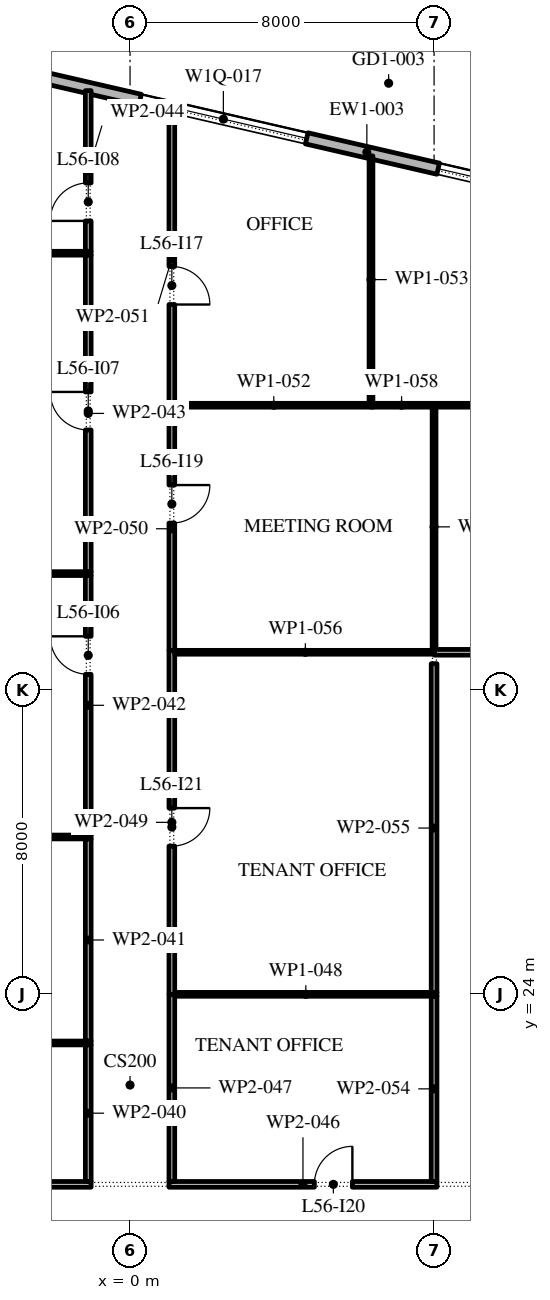
"""IFC4 building model, lengths in metres.
Left out: names, types, materials, properties, quantities, classifications, styles, units other than length and angle.
Written with IfcOpenShell. Run it as: python <this file> out.ifc"""

import sys

from ifc_helpers import new_model, si_unit, direction, frame, frame_2d, origin, place, context, subcontext, project, spatial, rectangle, extrude, element, fill, save


model = new_model("IFC4")
c1 = context("Model", 3, precision=1e-05, world=origin(), true_north=direction((0.0, 1.0)))
c2 = subcontext(c1, "Body", "Model", "MODEL_VIEW")
j1 = project(units=[si_unit("LENGTHUNIT", "METRE"), si_unit("PLANEANGLEUNIT", "RADIAN")], contexts=[c1])
p1 = place(None, origin())
s1 = spatial("IfcSite", under=j1, at=p1, CompositionType="ELEMENT")
p2 = place(p1, origin())
s2 = spatial("IfcBuilding", under=s1, at=p2, CompositionType="ELEMENT")
p3 = place(p2, frame((0.0, 0.0, 259.8)))
s3 = spatial("IfcBuildingStorey", under=s2, at=p3, CompositionType="ELEMENT", Elevation=259.8)
p4 = place(p3, frame((29.616, 40.758, 0.0), z_axis=(0.0, 0.0, 1.0), x_axis=(-0.974370532314, 0.224949029246, 0.0)))
e1 = element("IfcWall", 1, at=p4, inside=s3, PredefinedType="STANDARD", context=c2, shape_type="SweptSolid", body=[
    extrude(rectangle(XDim=48.0, YDim=0.3, at=frame_2d((24.0, 0.0))), origin(), (0.0, 0.0, 1.0), 4.0),
])
p5 = place(p4, frame((1.625, 0.0, 0.45)))
e2 = element("IfcOpeningElement", 2, at=p5, cuts=e1, PredefinedType="OPENING", context=c2, shape_type="SweptSolid", body=[
    extrude(rectangle(XDim=4.5, YDim=2.65, at=frame_2d((2.25, 1.325))), frame((0.0, 0.16, 0.0), z_axis=(0.0, -1.0, 0.0), x_axis=(1.0, 0.0, 0.0)), (0.0, 0.0, 1.0), 0.32),
])
p6 = place(p4, frame((10.575, 0.0, 0.0)))
e3 = element("IfcOpeningElement", 3, at=p6, cuts=e1, PredefinedType="OPENING", context=c2, shape_type="SweptSolid", body=[
    extrude(rectangle(XDim=2.4, YDim=3.5, at=frame_2d((1.2, 1.75))), frame((0.0, 0.16, 0.0), z_axis=(0.0, -1.0, 0.0), x_axis=(1.0, 0.0, 0.0)), (0.0, 0.0, 1.0), 0.32),
])
p7 = place(p4, frame((17.575, 0.0, 0.45)))
e4 = element("IfcOpeningElement", 4, at=p7, cuts=e1, PredefinedType="OPENING", context=c2, shape_type="SweptSolid", body=[
    extrude(rectangle(XDim=4.5, YDim=2.5, at=frame_2d((2.25, 1.25))), frame((0.0, 0.16, 0.0), z_axis=(0.0, -1.0, 0.0), x_axis=(1.0, 0.0, 0.0)), (0.0, 0.0, 1.0), 0.32),
])
p8 = place(p4, frame((25.625, 0.0, 0.45)))
e5 = element("IfcOpeningElement", 5, at=p8, cuts=e1, PredefinedType="OPENING", context=c2, shape_type="SweptSolid", body=[
    extrude(rectangle(XDim=4.5, YDim=2.45, at=frame_2d((2.25, 1.225))), frame((0.0, 0.16, 0.0), z_axis=(0.0, -1.0, 0.0), x_axis=(1.0, 0.0, 0.0)), (0.0, 0.0, 1.0), 0.32),
])
p9 = place(p4, frame((33.675, 0.0, 0.45)))
e6 = element("IfcOpeningElement", 6, at=p9, cuts=e1, PredefinedType="OPENING", context=c2, shape_type="SweptSolid", body=[
    extrude(rectangle(XDim=4.5, YDim=2.45, at=frame_2d((2.25, 1.225))), frame((0.0, 0.16, 0.0), z_axis=(0.0, -1.0, 0.0), x_axis=(1.0, 0.0, 0.0)), (0.0, 0.0, 1.0), 0.32),
])
p10 = place(p4, frame((42.775, 0.0, 0.0)))
e7 = element("IfcOpeningElement", 7, at=p10, cuts=e1, PredefinedType="OPENING", context=c2, shape_type="SweptSolid", body=[
    extrude(rectangle(XDim=2.4, YDim=3.5, at=frame_2d((1.2, 1.75))), frame((0.0, 0.16, 0.0), z_axis=(0.0, -1.0, 0.0), x_axis=(1.0, 0.0, 0.0)), (0.0, 0.0, 1.0), 0.32),
])
p11 = place(p3, frame((-9.29, 43.5, 0.0), z_axis=(0.0, 0.0, 1.0), x_axis=(1.0, 0.0, 0.0)))
e8 = element("IfcWall", 8, at=p11, inside=s3, PredefinedType="PARTITIONING", context=c2, shape_type="SweptSolid", body=[
    extrude(rectangle(XDim=8.265, YDim=0.1, at=frame_2d((4.133, 0.0))), origin(), (0.0, 0.0, 1.0), 4.0),
])
p12 = place(p3, frame((-7.935, 35.07, 0.0), z_axis=(0.0, 0.0, 1.0), x_axis=(1.0, 0.0, 0.0)))
e9 = element("IfcWall", 9, at=p12, inside=s3, PredefinedType="PARTITIONING", context=c2, shape_type="SweptSolid", body=[
    extrude(rectangle(XDim=6.91, YDim=0.1, at=frame_2d((3.455, 0.0))), origin(), (0.0, 0.0, 1.0), 4.0),
])
p13 = place(p3, frame((-8.075, 19.0, 0.0), z_axis=(0.0, 0.0, 1.0), x_axis=(1.0, 0.0, 0.0)))
e10 = element("IfcWall", 10, at=p13, inside=s3, PredefinedType="PARTITIONING", context=c2, shape_type="SweptSolid", body=[
    extrude(rectangle(XDim=7.05, YDim=0.15, at=frame_2d((3.525, 0.0))), origin(), (0.0, 0.0, 1.0), 4.0),
])
p14 = place(p13, frame((1.575, 0.0, 0.0)))
e11 = element("IfcOpeningElement", 11, at=p14, cuts=e10, PredefinedType="OPENING", context=c2, shape_type="SweptSolid", body=[
    extrude(rectangle(XDim=1.0, YDim=2.1, at=frame_2d((0.5, 1.05))), frame((0.0, 0.085, 0.0), z_axis=(0.0, -1.0, 0.0), x_axis=(1.0, 0.0, 0.0)), (0.0, 0.0, 1.0), 0.17),
])
for number, where, z_axis, x_axis in (
    (12, (-7.925, 22.72, 0.0), (0.0, 0.0, 1.0), (1.0, 0.0, 0.0)),
    (13, (-7.925, 28.14, 0.0), (0.0, 0.0, 1.0), (1.0, 0.0, 0.0)),
):
    element("IfcWall", number, at=place(p3, frame(where, z_axis=z_axis, x_axis=x_axis)), inside=s3, PredefinedType="PARTITIONING", context=c2, shape_type="SweptSolid", body=[
        extrude(rectangle(XDim=6.9, YDim=0.1, at=frame_2d((3.45, 0.0))), origin(), (0.0, 0.0, 1.0), 4.0),
    ])
p15 = place(p3, frame((-1.1, 19.075, 0.0), z_axis=(0.0, 0.0, 1.0), x_axis=(0.0, 1.0, 0.0)))
e14 = element("IfcWall", 14, at=p15, inside=s3, PredefinedType="PARTITIONING", context=c2, shape_type="SweptSolid", body=[
    extrude(rectangle(XDim=3.595, YDim=0.15, at=frame_2d((1.797, 0.0))), origin(), (0.0, 0.0, 1.0), 4.0),
])
p16 = place(p3, frame((-1.1, 22.77, 0.0), z_axis=(0.0, 0.0, 1.0), x_axis=(0.0, 1.0, 0.0)))
e15 = element("IfcWall", 15, at=p16, inside=s3, PredefinedType="PARTITIONING", context=c2, shape_type="SweptSolid", body=[
    extrude(rectangle(XDim=5.32, YDim=0.15, at=frame_2d((2.66, 0.0))), origin(), (0.0, 0.0, 1.0), 4.0),
])
p17 = place(p3, frame((-1.1, 28.19, 0.0), z_axis=(0.0, 0.0, 1.0), x_axis=(0.0, 1.0, 0.0)))
e16 = element("IfcWall", 16, at=p17, inside=s3, PredefinedType="PARTITIONING", context=c2, shape_type="SweptSolid", body=[
    extrude(rectangle(XDim=6.83, YDim=0.15, at=frame_2d((3.415, 0.0))), origin(), (0.0, 0.0, 1.0), 4.0),
])
p18 = place(p17, frame((4.23, 0.0, 0.0)))
e17 = element("IfcOpeningElement", 17, at=p18, cuts=e16, PredefinedType="OPENING", context=c2, shape_type="SweptSolid", body=[
    extrude(rectangle(XDim=1.0, YDim=2.1, at=frame_2d((0.5, 1.05))), frame((0.0, 0.085, 0.0), z_axis=(0.0, -1.0, 0.0), x_axis=(1.0, 0.0, 0.0)), (0.0, 0.0, 1.0), 0.17),
])
p19 = place(p3, frame((-1.1, 35.12, 0.0), z_axis=(0.0, 0.0, 1.0), x_axis=(0.0, 1.0, 0.0)))
e18 = element("IfcWall", 18, at=p19, inside=s3, PredefinedType="PARTITIONING", context=c2, shape_type="SweptSolid", body=[
    extrude(rectangle(XDim=8.33, YDim=0.15, at=frame_2d((4.165, 0.0))), origin(), (0.0, 0.0, 1.0), 4.0),
])
p20 = place(p19, frame((3.73, 0.0, 0.0)))
e19 = element("IfcOpeningElement", 19, at=p20, cuts=e18, PredefinedType="OPENING", context=c2, shape_type="SweptSolid", body=[
    extrude(rectangle(XDim=1.0, YDim=2.1, at=frame_2d((0.5, 1.05))), frame((0.0, 0.085, 0.0), z_axis=(0.0, -1.0, 0.0), x_axis=(1.0, 0.0, 0.0)), (0.0, 0.0, 1.0), 0.17),
])
p21 = place(p3, frame((-1.1, 43.55, 0.0), z_axis=(0.0, 0.0, 1.0), x_axis=(0.0, 1.0, 0.0)))
e20 = element("IfcWall", 20, at=p21, inside=s3, PredefinedType="PARTITIONING", context=c2, shape_type="SweptSolid", body=[
    extrude(rectangle(XDim=4.228, YDim=0.15, at=frame_2d((2.114, 0.0))), origin(), (0.0, 0.0, 1.0), 4.0),
])
p22 = place(p21, frame((0.8, 0.0, 0.0)))
e21 = element("IfcOpeningElement", 21, at=p22, cuts=e20, PredefinedType="OPENING", context=c2, shape_type="SweptSolid", body=[
    extrude(rectangle(XDim=1.0, YDim=2.1, at=frame_2d((0.5, 1.05))), frame((0.0, 0.085, 0.0), z_axis=(0.0, -1.0, 0.0), x_axis=(1.0, 0.0, 0.0)), (0.0, 0.0, 1.0), 0.17),
])
p23 = place(p3, frame((1.025, 19.0, 0.0), z_axis=(0.0, 0.0, 1.0), x_axis=(1.0, 0.0, 0.0)))
e22 = element("IfcWall", 22, at=p23, inside=s3, PredefinedType="PARTITIONING", context=c2, shape_type="SweptSolid", body=[
    extrude(rectangle(XDim=7.05, YDim=0.15, at=frame_2d((3.525, 0.0))), origin(), (0.0, 0.0, 1.0), 4.0),
])
p24 = place(p23, frame((3.825, 0.0, 0.0)))
e23 = element("IfcOpeningElement", 23, at=p24, cuts=e22, PredefinedType="OPENING", context=c2, shape_type="SweptSolid", body=[
    extrude(rectangle(XDim=1.0, YDim=2.1, at=frame_2d((0.5, 1.05))), frame((0.0, 0.085, 0.0), z_axis=(0.0, -1.0, 0.0), x_axis=(1.0, 0.0, 0.0)), (0.0, 0.0, 1.0), 0.17),
])
p25 = place(p3, frame((1.1, 24.0, 0.0), z_axis=(0.0, 0.0, 1.0), x_axis=(0.0, -1.0, 0.0)))
e24 = element("IfcWall", 24, at=p25, inside=s3, PredefinedType="PARTITIONING", context=c2, shape_type="SweptSolid", body=[
    extrude(rectangle(XDim=4.925, YDim=0.15, at=frame_2d((2.462, 0.0))), origin(), (0.0, 0.0, 1.0), 4.0),
])
p26 = place(p3, frame((1.175, 24.0, 0.0), z_axis=(0.0, 0.0, 1.0), x_axis=(1.0, 0.0, 0.0)))
e25 = element("IfcWall", 25, at=p26, inside=s3, PredefinedType="PARTITIONING", context=c2, shape_type="SweptSolid", body=[
    extrude(rectangle(XDim=6.9, YDim=0.1, at=frame_2d((3.45, 0.0))), origin(), (0.0, 0.0, 1.0), 4.0),
])
p27 = place(p3, frame((1.1, 33.05, 0.0), z_axis=(0.0, 0.0, 1.0), x_axis=(0.0, -1.0, 0.0)))
e26 = element("IfcWall", 26, at=p27, inside=s3, PredefinedType="PARTITIONING", context=c2, shape_type="SweptSolid", body=[
    extrude(rectangle(XDim=9.05, YDim=0.15, at=frame_2d((4.525, 0.0))), origin(), (0.0, 0.0, 1.0), 4.0),
])
p28 = place(p27, frame((4.15, 0.0, 0.0)))
e27 = element("IfcOpeningElement", 27, at=p28, cuts=e26, PredefinedType="OPENING", context=c2, shape_type="SweptSolid", body=[
    extrude(rectangle(XDim=1.0, YDim=2.1, at=frame_2d((0.5, 1.05))), frame((0.0, 0.085, 0.0), z_axis=(0.0, -1.0, 0.0), x_axis=(1.0, 0.0, 0.0)), (0.0, 0.0, 1.0), 0.17),
])
p29 = place(p3, frame((1.1, 39.45, 0.0), z_axis=(0.0, 0.0, 1.0), x_axis=(0.0, -1.0, 0.0)))
e28 = element("IfcWall", 28, at=p29, inside=s3, PredefinedType="PARTITIONING", context=c2, shape_type="SweptSolid", body=[
    extrude(rectangle(XDim=6.4, YDim=0.15, at=frame_2d((3.2, 0.0))), origin(), (0.0, 0.0, 1.0), 4.0),
])
p30 = place(p29, frame((2.05, 0.0, 0.0)))
e29 = element("IfcOpeningElement", 29, at=p30, cuts=e28, PredefinedType="OPENING", context=c2, shape_type="SweptSolid", body=[
    extrude(rectangle(XDim=1.0, YDim=2.1, at=frame_2d((0.5, 1.05))), frame((0.0, 0.085, 0.0), z_axis=(0.0, -1.0, 0.0), x_axis=(1.0, 0.0, 0.0)), (0.0, 0.0, 1.0), 0.17),
])
p31 = place(p3, frame((1.1, 47.27, 0.0), z_axis=(0.0, 0.0, 1.0), x_axis=(0.0, -1.0, 0.0)))
e30 = element("IfcWall", 30, at=p31, inside=s3, PredefinedType="PARTITIONING", context=c2, shape_type="SweptSolid", body=[
    extrude(rectangle(XDim=7.82, YDim=0.15, at=frame_2d((3.91, 0.0))), origin(), (0.0, 0.0, 1.0), 4.0),
])
p32 = place(p31, frame((4.12, 0.0, 0.0)))
e31 = element("IfcOpeningElement", 31, at=p32, cuts=e30, PredefinedType="OPENING", context=c2, shape_type="SweptSolid", body=[
    extrude(rectangle(XDim=1.0, YDim=2.1, at=frame_2d((0.5, 1.05))), frame((0.0, 0.085, 0.0), z_axis=(0.0, -1.0, 0.0), x_axis=(1.0, 0.0, 0.0)), (0.0, 0.0, 1.0), 0.17),
])
p33 = place(p3, frame((6.39, 39.5, 0.0), z_axis=(0.0, 0.0, 1.0), x_axis=(-1.0, 0.0, 0.0)))
e32 = element("IfcWall", 32, at=p33, inside=s3, PredefinedType="PARTITIONING", context=c2, shape_type="SweptSolid", body=[
    extrude(rectangle(XDim=5.215, YDim=0.1, at=frame_2d((2.607, 0.0))), origin(), (0.0, 0.0, 1.0), 4.0),
])
p34 = place(p3, frame((6.34, 39.55, 0.0), z_axis=(0.0, 0.0, 1.0), x_axis=(0.0, 1.0, 0.0)))
e33 = element("IfcWall", 33, at=p34, inside=s3, PredefinedType="PARTITIONING", context=c2, shape_type="SweptSolid", body=[
    extrude(rectangle(XDim=6.511, YDim=0.1, at=frame_2d((3.255, 0.0))), origin(), (0.0, 0.0, 1.0), 4.0),
])
p35 = place(p3, frame((8.0, 19.075, 0.0), z_axis=(0.0, 0.0, 1.0), x_axis=(0.0, 1.0, 0.0)))
e34 = element("IfcWall", 34, at=p35, inside=s3, PredefinedType="PARTITIONING", context=c2, shape_type="SweptSolid", body=[
    extrude(rectangle(XDim=4.875, YDim=0.15, at=frame_2d((2.438, 0.0))), origin(), (0.0, 0.0, 1.0), 4.0),
])
p36 = place(p3, frame((8.0, 24.05, 0.0), z_axis=(0.0, 0.0, 1.0), x_axis=(0.0, 1.0, 0.0)))
e35 = element("IfcWall", 35, at=p36, inside=s3, PredefinedType="PARTITIONING", context=c2, shape_type="SweptSolid", body=[
    extrude(rectangle(XDim=8.65, YDim=0.15, at=frame_2d((4.325, 0.0))), origin(), (0.0, 0.0, 1.0), 4.0),
])
p37 = place(p3, frame((8.05, 33.0, 0.0), z_axis=(0.0, 0.0, 1.0), x_axis=(-1.0, 0.0, 0.0)))
e36 = element("IfcWall", 36, at=p37, inside=s3, PredefinedType="PARTITIONING", context=c2, shape_type="SweptSolid", body=[
    extrude(rectangle(XDim=6.875, YDim=0.1, at=frame_2d((3.438, 0.0))), origin(), (0.0, 0.0, 1.0), 4.0),
])
p38 = place(p3, frame((8.0, 33.05, 0.0), z_axis=(0.0, 0.0, 1.0), x_axis=(0.0, 1.0, 0.0)))
e37 = element("IfcWall", 37, at=p38, inside=s3, PredefinedType="PARTITIONING", context=c2, shape_type="SweptSolid", body=[
    extrude(rectangle(XDim=6.5, YDim=0.1, at=frame_2d((3.25, 0.0))), origin(), (0.0, 0.0, 1.0), 4.0),
])
p39 = place(p3, frame((7.95, 39.5, 0.0), z_axis=(0.0, 0.0, 1.0), x_axis=(-1.0, 0.0, 0.0)))
e38 = element("IfcWall", 38, at=p39, inside=s3, PredefinedType="PARTITIONING", context=c2, shape_type="SweptSolid", body=[
    extrude(rectangle(XDim=1.61, YDim=0.1, at=frame_2d((0.805, 0.0))), origin(), (0.0, 0.0, 1.0), 4.0),
])
p40 = place(p3, frame((8.01, 33.0, 0.0), z_axis=(0.0, 0.0, 1.0), x_axis=(1.0, 0.0, 0.0)))
e39 = element("IfcWall", 39, at=p40, inside=s3, PredefinedType="PARTITIONING", context=c2, shape_type="SweptSolid", body=[
    extrude(rectangle(XDim=6.255, YDim=0.15, at=frame_2d((3.127, 0.0))), origin(), (0.0, 0.0, 1.0), 4.0),
])
p41 = place(p40, frame((1.28, 0.0, 0.0)))
e40 = element("IfcOpeningElement", 40, at=p41, cuts=e39, PredefinedType="OPENING", context=c2, shape_type="SweptSolid", body=[
    extrude(rectangle(XDim=1.0, YDim=2.1, at=frame_2d((0.5, 1.05))), frame((0.0, 0.085, 0.0), z_axis=(0.0, -1.0, 0.0), x_axis=(1.0, 0.0, 0.0)), (0.0, 0.0, 1.0), 0.17),
])
p42 = place(p3, frame((22.08, 39.5, 0.0), z_axis=(0.0, 0.0, 1.0), x_axis=(-1.0, 0.0, 0.0)))
e41 = element("IfcWall", 41, at=p42, inside=s3, PredefinedType="PARTITIONING", context=c2, shape_type="SweptSolid", body=[
    extrude(rectangle(XDim=14.03, YDim=0.1, at=frame_2d((7.015, 0.0))), origin(), (0.0, 0.0, 1.0), 4.0),
])
p43 = place(p42, frame((8.0, 0.0, 0.0)))
e42 = element("IfcOpeningElement", 42, at=p43, cuts=e41, PredefinedType="OPENING", context=c2, shape_type="SweptSolid", body=[
    extrude(rectangle(XDim=0.9, YDim=2.1, at=frame_2d((0.45, 1.05))), frame((0.0, 0.06, 0.0), z_axis=(0.0, -1.0, 0.0), x_axis=(1.0, 0.0, 0.0)), (0.0, 0.0, 1.0), 0.12),
])
p44 = place(p7, origin())
e43 = element("IfcWindow", 43, at=p44, inside=s3, PartitioningType="DOUBLE_PANEL_VERTICAL", PredefinedType="WINDOW", context=c2, shape_type="SweptSolid", body=[
    extrude(rectangle(XDim=4.5, YDim=2.5, at=frame_2d((2.25, 1.25))), frame((0.0, 0.03, 0.0), z_axis=(0.0, -1.0, 0.0), x_axis=(1.0, 0.0, 0.0)), (0.0, 0.0, 1.0), 0.06),
])
fill(e4, e43)
p45 = place(p8, origin())
e44 = element("IfcWindow", 44, at=p45, inside=s3, PartitioningType="DOUBLE_PANEL_VERTICAL", PredefinedType="WINDOW", context=c2, shape_type="SweptSolid", body=[
    extrude(rectangle(XDim=4.5, YDim=2.45, at=frame_2d((2.25, 1.225))), frame((0.0, 0.03, 0.0), z_axis=(0.0, -1.0, 0.0), x_axis=(1.0, 0.0, 0.0)), (0.0, 0.0, 1.0), 0.06),
])
fill(e5, e44)
p46 = place(p18, origin())
e45 = element("IfcDoor", 45, at=p46, inside=s3, OperationType="SINGLE_SWING_LEFT", PredefinedType="DOOR", context=c2, shape_type="SweptSolid", body=[
    extrude(rectangle(XDim=1.0, YDim=2.1, at=frame_2d((0.5, 1.05))), frame((0.0, 0.025, 0.0), z_axis=(0.0, -1.0, 0.0), x_axis=(1.0, 0.0, 0.0)), (0.0, 0.0, 1.0), 0.05),
])
fill(e17, e45)
p47 = place(p20, origin())
e46 = element("IfcDoor", 46, at=p47, inside=s3, OperationType="SINGLE_SWING_LEFT", PredefinedType="DOOR", context=c2, shape_type="SweptSolid", body=[
    extrude(rectangle(XDim=1.0, YDim=2.1, at=frame_2d((0.5, 1.05))), frame((0.0, 0.025, 0.0), z_axis=(0.0, -1.0, 0.0), x_axis=(1.0, 0.0, 0.0)), (0.0, 0.0, 1.0), 0.05),
])
fill(e19, e46)
p48 = place(p22, origin())
e47 = element("IfcDoor", 47, at=p48, inside=s3, OperationType="SINGLE_SWING_RIGHT", PredefinedType="DOOR", context=c2, shape_type="SweptSolid", body=[
    extrude(rectangle(XDim=1.0, YDim=2.1, at=frame_2d((0.5, 1.05))), frame((0.0, 0.025, 0.0), z_axis=(0.0, -1.0, 0.0), x_axis=(1.0, 0.0, 0.0)), (0.0, 0.0, 1.0), 0.05),
])
fill(e21, e47)
p49 = place(p32, origin())
e48 = element("IfcDoor", 48, at=p49, inside=s3, OperationType="SINGLE_SWING_LEFT", PredefinedType="DOOR", context=c2, shape_type="SweptSolid", body=[
    extrude(rectangle(XDim=1.0, YDim=2.1, at=frame_2d((0.5, 1.05))), frame((0.0, 0.025, 0.0), z_axis=(0.0, -1.0, 0.0), x_axis=(1.0, 0.0, 0.0)), (0.0, 0.0, 1.0), 0.05),
])
fill(e31, e48)
p50 = place(p30, origin())
e49 = element("IfcDoor", 49, at=p50, inside=s3, OperationType="SINGLE_SWING_RIGHT", PredefinedType="DOOR", context=c2, shape_type="SweptSolid", body=[
    extrude(rectangle(XDim=1.0, YDim=2.1, at=frame_2d((0.5, 1.05))), frame((0.0, 0.025, 0.0), z_axis=(0.0, -1.0, 0.0), x_axis=(1.0, 0.0, 0.0)), (0.0, 0.0, 1.0), 0.05),
])
fill(e29, e49)
p51 = place(p24, origin())
e50 = element("IfcDoor", 50, at=p51, inside=s3, OperationType="SINGLE_SWING_LEFT", PredefinedType="DOOR", context=c2, shape_type="SweptSolid", body=[
    extrude(rectangle(XDim=1.0, YDim=2.1, at=frame_2d((0.5, 1.05))), frame((0.0, 0.025, 0.0), z_axis=(0.0, -1.0, 0.0), x_axis=(1.0, 0.0, 0.0)), (0.0, 0.0, 1.0), 0.05),
])
fill(e23, e50)
p52 = place(p28, origin())
e51 = element("IfcDoor", 51, at=p52, inside=s3, OperationType="SINGLE_SWING_RIGHT", PredefinedType="DOOR", context=c2, shape_type="SweptSolid", body=[
    extrude(rectangle(XDim=1.0, YDim=2.1, at=frame_2d((0.5, 1.05))), frame((0.0, 0.025, 0.0), z_axis=(0.0, -1.0, 0.0), x_axis=(1.0, 0.0, 0.0)), (0.0, 0.0, 1.0), 0.05),
])
fill(e27, e51)
save(model, sys.argv[1])
